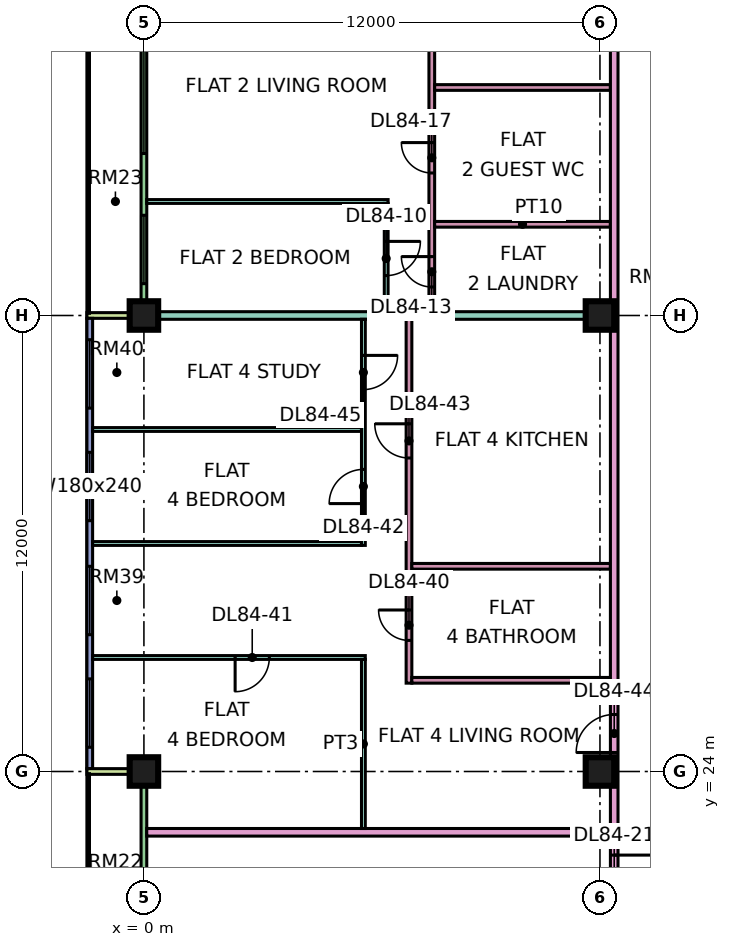
"""IFC4 building model, lengths in metres.
Left out: names, types, materials, properties, quantities, classifications, styles, units other than length and angle.
Written with IfcOpenShell. Run it as: python <this file> out.ifc"""

import sys

from ifc_helpers import new_model, si_unit, direction, frame, frame_2d, origin, origin_2d, place, context, subcontext, project, spatial, rectangle, extrude, element, fill, save


model = new_model("IFC4")
c1 = context("Model", 3, precision=1e-05, world=origin(), true_north=direction((0.0, 1.0)))
c2 = subcontext(c1, "Body", "Model", "MODEL_VIEW")
j1 = project(units=[si_unit("LENGTHUNIT", "METRE"), si_unit("PLANEANGLEUNIT", "RADIAN")], contexts=[c1])
p1 = place(None, origin())
s1 = spatial("IfcSite", under=j1, at=p1, CompositionType="ELEMENT")
p2 = place(p1, origin())
s2 = spatial("IfcBuilding", under=s1, at=p2, CompositionType="ELEMENT")
p3 = place(p2, frame((0.0, 0.0, 361.4)))
s3 = spatial("IfcBuildingStorey", under=s2, at=p3, CompositionType="ELEMENT", Elevation=361.4)
p4 = place(p3, frame((0.0, 24.0, 0.0), z_axis=(0.0, 0.0, 1.0), x_axis=(1.0, 0.0, 0.0)))
e1 = element("IfcColumn", 1, at=p4, inside=s3, PredefinedType="COLUMN", context=c2, shape_type="SweptSolid", body=[
    extrude(rectangle(XDim=0.75, YDim=0.75, at=origin_2d()), origin(), (0.0, 0.0, 1.0), 3.75),
])
p5 = place(p3, frame((0.0, 36.0, 0.0), z_axis=(0.0, 0.0, 1.0), x_axis=(1.0, 0.0, 0.0)))
e2 = element("IfcColumn", 2, at=p5, inside=s3, PredefinedType="COLUMN", context=c2, shape_type="SweptSolid", body=[
    extrude(rectangle(XDim=0.75, YDim=0.75, at=origin_2d()), origin(), (0.0, 0.0, 1.0), 3.75),
])
for number, where, z_axis, x_axis in (
    (3, (12.0, 24.0, 0.0), (0.0, 0.0, 1.0), (1.0, 0.0, 0.0)),
    (4, (12.0, 36.0, 0.0), (0.0, 0.0, 1.0), (1.0, 0.0, 0.0)),
):
    element("IfcColumn", number, at=place(p3, frame(where, z_axis=z_axis, x_axis=x_axis)), inside=s3, PredefinedType="COLUMN", context=c2, shape_type="SweptSolid", body=[
        extrude(rectangle(XDim=0.75, YDim=0.75, at=origin_2d()), origin(), (0.0, 0.0, 1.0), 3.75),
    ])
p6 = place(p3, frame((0.0, 47.925, 0.0), z_axis=(0.0, 0.0, 1.0), x_axis=(0.0, -1.0, 0.0)))
e5 = element("IfcWall", 5, at=p6, inside=s3, PredefinedType="SOLIDWALL", context=c2, shape_type="SweptSolid", body=[
    extrude(rectangle(XDim=11.85, YDim=0.15, at=frame_2d((5.925, 0.0))), origin(), (0.0, 0.0, 1.0), 3.35),
])
p7 = place(p6, frame((0.625, 0.0, 0.0)))
e6 = element("IfcOpeningElement", 6, at=p7, cuts=e5, PredefinedType="OPENING", context=c2, shape_type="SweptSolid", body=[
    extrude(rectangle(XDim=1.2, YDim=2.4, at=frame_2d((0.6, 1.2))), frame((0.0, 0.085, 0.0), z_axis=(0.0, -1.0, 0.0), x_axis=(1.0, 0.0, 0.0)), (0.0, 0.0, 1.0), 0.17),
])
p8 = place(p6, frame((4.663, 0.0, 0.45)))
e7 = element("IfcOpeningElement", 7, at=p8, cuts=e5, PredefinedType="OPENING", context=c2, shape_type="SweptSolid", body=[
    extrude(rectangle(XDim=3.0, YDim=2.4, at=frame_2d((1.5, 1.2))), frame((0.0, 0.085, 0.0), z_axis=(0.0, -1.0, 0.0), x_axis=(1.0, 0.0, 0.0)), (0.0, 0.0, 1.0), 0.17),
])
p9 = place(p6, frame((9.288, 0.0, 0.45)))
e8 = element("IfcOpeningElement", 8, at=p9, cuts=e5, PredefinedType="OPENING", context=c2, shape_type="SweptSolid", body=[
    extrude(rectangle(XDim=1.8, YDim=2.4, at=frame_2d((0.9, 1.2))), frame((0.0, 0.085, 0.0), z_axis=(0.0, -1.0, 0.0), x_axis=(1.0, 0.0, 0.0)), (0.0, 0.0, 1.0), 0.17),
])
p10 = place(p3, frame((-1.5, 36.0, 0.0), z_axis=(0.0, 0.0, 1.0), x_axis=(1.0, 0.0, 0.0)))
e9 = element("IfcWall", 9, at=p10, inside=s3, PredefinedType="SOLIDWALL", context=c2, shape_type="SweptSolid", body=[
    extrude(rectangle(XDim=1.5, YDim=0.15, at=frame_2d((0.75, 0.0))), origin(), (0.0, 0.0, 1.0), 3.35),
])
p11 = place(p3, frame((-1.425, 35.925, 0.0), z_axis=(0.0, 0.0, 1.0), x_axis=(0.0, -1.0, 0.0)))
e10 = element("IfcWall", 10, at=p11, inside=s3, PredefinedType="SOLIDWALL", context=c2, shape_type="SweptSolid", body=[
    extrude(rectangle(XDim=11.85, YDim=0.15, at=frame_2d((5.925, 0.0))), origin(), (0.0, 0.0, 1.0), 3.35),
])
p12 = place(p11, frame((0.562, 0.0, 0.45)))
e11 = element("IfcOpeningElement", 11, at=p12, cuts=e10, PredefinedType="OPENING", context=c2, shape_type="SweptSolid", body=[
    extrude(rectangle(XDim=1.8, YDim=2.4, at=frame_2d((0.9, 1.2))), frame((0.0, 0.085, 0.0), z_axis=(0.0, -1.0, 0.0), x_axis=(1.0, 0.0, 0.0)), (0.0, 0.0, 1.0), 0.17),
])
p13 = place(p11, frame((3.525, 0.0, 0.45)))
e12 = element("IfcOpeningElement", 12, at=p13, cuts=e10, PredefinedType="OPENING", context=c2, shape_type="SweptSolid", body=[
    extrude(rectangle(XDim=1.8, YDim=2.4, at=frame_2d((0.9, 1.2))), frame((0.0, 0.085, 0.0), z_axis=(0.0, -1.0, 0.0), x_axis=(1.0, 0.0, 0.0)), (0.0, 0.0, 1.0), 0.17),
])
p14 = place(p11, frame((6.525, 0.0, 0.45)))
e13 = element("IfcOpeningElement", 13, at=p14, cuts=e10, PredefinedType="OPENING", context=c2, shape_type="SweptSolid", body=[
    extrude(rectangle(XDim=1.8, YDim=2.4, at=frame_2d((0.9, 1.2))), frame((0.0, 0.085, 0.0), z_axis=(0.0, -1.0, 0.0), x_axis=(1.0, 0.0, 0.0)), (0.0, 0.0, 1.0), 0.17),
])
p15 = place(p11, frame((9.488, 0.0, 0.45)))
e14 = element("IfcOpeningElement", 14, at=p15, cuts=e10, PredefinedType="OPENING", context=c2, shape_type="SweptSolid", body=[
    extrude(rectangle(XDim=1.8, YDim=2.4, at=frame_2d((0.9, 1.2))), frame((0.0, 0.085, 0.0), z_axis=(0.0, -1.0, 0.0), x_axis=(1.0, 0.0, 0.0)), (0.0, 0.0, 1.0), 0.17),
])
p16 = place(p3, frame((0.0, 23.925, 0.0), z_axis=(0.0, 0.0, 1.0), x_axis=(0.0, -1.0, 0.0)))
e15 = element("IfcWall", 15, at=p16, inside=s3, PredefinedType="SOLIDWALL", context=c2, shape_type="SweptSolid", body=[
    extrude(rectangle(XDim=11.35, YDim=0.15, at=frame_2d((5.675, 0.0))), origin(), (0.0, 0.0, 1.0), 3.35),
])
p17 = place(p16, frame((6.738, 0.0, 0.0)))
e16 = element("IfcOpeningElement", 16, at=p17, cuts=e15, PredefinedType="OPENING", context=c2, shape_type="SweptSolid", body=[
    extrude(rectangle(XDim=1.8, YDim=2.4, at=frame_2d((0.9, 1.2))), frame((0.0, 0.085, 0.0), z_axis=(0.0, -1.0, 0.0), x_axis=(1.0, 0.0, 0.0)), (0.0, 0.0, 1.0), 0.17),
])
p18 = place(p3, frame((-1.5, 24.0, 0.0), z_axis=(0.0, 0.0, 1.0), x_axis=(1.0, 0.0, 0.0)))
e17 = element("IfcWall", 17, at=p18, inside=s3, PredefinedType="SOLIDWALL", context=c2, shape_type="SweptSolid", body=[
    extrude(rectangle(XDim=1.5, YDim=0.15, at=frame_2d((0.75, 0.0))), origin(), (0.0, 0.0, 1.0), 3.35),
])
p19 = place(p3, frame((-1.35, 27.0, 0.0), z_axis=(0.0, 0.0, 1.0), x_axis=(1.0, 0.0, 0.0)))
e18 = element("IfcWall", 18, at=p19, inside=s3, PredefinedType="PARTITIONING", context=c2, shape_type="SweptSolid", body=[
    extrude(rectangle(XDim=7.175, YDim=0.1, at=frame_2d((3.587, 0.0))), origin(), (0.0, 0.0, 1.0), 3.35),
])
p20 = place(p19, frame((3.75, 0.0, 0.0)))
e19 = element("IfcOpeningElement", 19, at=p20, cuts=e18, PredefinedType="OPENING", context=c2, shape_type="SweptSolid", body=[
    extrude(rectangle(XDim=0.9, YDim=2.1, at=frame_2d((0.45, 1.05))), frame((0.0, 0.06, 0.0), z_axis=(0.0, -1.0, 0.0), x_axis=(1.0, 0.0, 0.0)), (0.0, 0.0, 1.0), 0.12),
])
for number, where, z_axis, x_axis in (
    (20, (-1.35, 30.0, 0.0), (0.0, 0.0, 1.0), (1.0, 0.0, 0.0)),
    (21, (-1.35, 33.0, 0.0), (0.0, 0.0, 1.0), (1.0, 0.0, 0.0)),
):
    element("IfcWall", number, at=place(p3, frame(where, z_axis=z_axis, x_axis=x_axis)), inside=s3, PredefinedType="PARTITIONING", context=c2, shape_type="SweptSolid", body=[
        extrude(rectangle(XDim=7.075, YDim=0.1, at=frame_2d((3.538, 0.0))), origin(), (0.0, 0.0, 1.0), 3.35),
    ])
e22 = element("IfcWall", 22, at=p5, inside=s3, PredefinedType="PARTITIONING", context=c2, shape_type="SweptSolid", body=[
    extrude(rectangle(XDim=12.275, YDim=0.2, at=frame_2d((6.137, 0.0))), origin(), (0.0, 0.0, 1.0), 3.35),
])
p21 = place(p3, frame((0.074, 22.4, 0.0), z_axis=(0.0, 0.0, 1.0), x_axis=(1.0, 0.0, 0.0)))
e23 = element("IfcWall", 23, at=p21, inside=s3, PredefinedType="PARTITIONING", context=c2, shape_type="SweptSolid", body=[
    extrude(rectangle(XDim=12.201, YDim=0.2, at=frame_2d((6.101, 0.0))), origin(), (0.0, 0.0, 1.0), 3.35),
])
p22 = place(p3, frame((0.074, 39.0, 0.0), z_axis=(0.0, 0.0, 1.0), x_axis=(1.0, 0.0, 0.0)))
e24 = element("IfcWall", 24, at=p22, inside=s3, PredefinedType="PARTITIONING", context=c2, shape_type="SweptSolid", body=[
    extrude(rectangle(XDim=6.351, YDim=0.1, at=frame_2d((3.176, 0.0))), origin(), (0.0, 0.0, 1.0), 3.35),
])
p23 = place(p3, frame((5.775, 22.5, 0.0), z_axis=(0.0, 0.0, 1.0), x_axis=(0.0, 1.0, 0.0)))
e25 = element("IfcWall", 25, at=p23, inside=s3, PredefinedType="PARTITIONING", context=c2, shape_type="SweptSolid", body=[
    extrude(rectangle(XDim=4.45, YDim=0.1, at=frame_2d((2.225, 0.0))), origin(), (0.0, 0.0, 1.0), 3.35),
])
p24 = place(p3, frame((5.775, 29.95, 0.0), z_axis=(0.0, 0.0, 1.0), x_axis=(0.0, 1.0, 0.0)))
e26 = element("IfcWall", 26, at=p24, inside=s3, PredefinedType="PARTITIONING", context=c2, shape_type="SweptSolid", body=[
    extrude(rectangle(XDim=5.95, YDim=0.1, at=frame_2d((2.975, 0.0))), origin(), (0.0, 0.0, 1.0), 3.35),
])
p25 = place(p24, frame((1.1, 0.0, 0.0)))
e27 = element("IfcOpeningElement", 27, at=p25, cuts=e26, PredefinedType="OPENING", context=c2, shape_type="SweptSolid", body=[
    extrude(rectangle(XDim=0.9, YDim=2.1, at=frame_2d((0.45, 1.05))), frame((0.0, 0.06, 0.0), z_axis=(0.0, -1.0, 0.0), x_axis=(1.0, 0.0, 0.0)), (0.0, 0.0, 1.0), 0.12),
])
p26 = place(p24, frame((4.1, 0.0, 0.0)))
e28 = element("IfcOpeningElement", 28, at=p26, cuts=e26, PredefinedType="OPENING", context=c2, shape_type="SweptSolid", body=[
    extrude(rectangle(XDim=0.9, YDim=2.1, at=frame_2d((0.45, 1.05))), frame((0.0, 0.06, 0.0), z_axis=(0.0, -1.0, 0.0), x_axis=(1.0, 0.0, 0.0)), (0.0, 0.0, 1.0), 0.12),
])
p27 = place(p3, frame((6.375, 36.1, 0.0), z_axis=(0.0, 0.0, 1.0), x_axis=(0.0, 1.0, 0.0)))
e29 = element("IfcWall", 29, at=p27, inside=s3, PredefinedType="PARTITIONING", context=c2, shape_type="SweptSolid", body=[
    extrude(rectangle(XDim=2.85, YDim=0.1, at=frame_2d((1.425, 0.0))), origin(), (0.0, 0.0, 1.0), 3.35),
])
p28 = place(p27, frame((0.95, 0.0, 0.0)))
e30 = element("IfcOpeningElement", 30, at=p28, cuts=e29, PredefinedType="OPENING", context=c2, shape_type="SweptSolid", body=[
    extrude(rectangle(XDim=0.9, YDim=2.1, at=frame_2d((0.45, 1.05))), frame((0.0, 0.06, 0.0), z_axis=(0.0, -1.0, 0.0), x_axis=(1.0, 0.0, 0.0)), (0.0, 0.0, 1.0), 0.12),
])
p29 = place(p3, frame((6.975, 26.325, 0.0), z_axis=(0.0, 0.0, 1.0), x_axis=(0.0, 1.0, 0.0)))
e31 = element("IfcWall", 31, at=p29, inside=s3, PredefinedType="PARTITIONING", context=c2, shape_type="SweptSolid", body=[
    extrude(rectangle(XDim=9.575, YDim=0.15, at=frame_2d((4.788, 0.0))), origin(), (0.0, 0.0, 1.0), 3.35),
])
p30 = place(p29, frame((1.125, 0.0, 0.0)))
e32 = element("IfcOpeningElement", 32, at=p30, cuts=e31, PredefinedType="OPENING", context=c2, shape_type="SweptSolid", body=[
    extrude(rectangle(XDim=0.8, YDim=2.1, at=frame_2d((0.4, 1.05))), frame((0.0, 0.085, 0.0), z_axis=(0.0, -1.0, 0.0), x_axis=(1.0, 0.0, 0.0)), (0.0, 0.0, 1.0), 0.17),
])
p31 = place(p29, frame((5.925, 0.0, 0.0)))
e33 = element("IfcOpeningElement", 33, at=p31, cuts=e31, PredefinedType="OPENING", context=c2, shape_type="SweptSolid", body=[
    extrude(rectangle(XDim=0.9, YDim=2.1, at=frame_2d((0.45, 1.05))), frame((0.0, 0.085, 0.0), z_axis=(0.0, -1.0, 0.0), x_axis=(1.0, 0.0, 0.0)), (0.0, 0.0, 1.0), 0.17),
])
for number, where, z_axis, x_axis in (
    (34, (7.05, 26.4, 0.0), (0.0, 0.0, 1.0), (1.0, 0.0, 0.0)),
    (35, (7.05, 29.4, 0.0), (0.0, 0.0, 1.0), (1.0, 0.0, 0.0)),
):
    element("IfcWall", number, at=place(p3, frame(where, z_axis=z_axis, x_axis=x_axis)), inside=s3, PredefinedType="PARTITIONING", context=c2, shape_type="SweptSolid", body=[
        extrude(rectangle(XDim=5.225, YDim=0.15, at=frame_2d((2.612, 0.0))), origin(), (0.0, 0.0, 1.0), 3.35),
    ])
p32 = place(p3, frame((7.575, 36.1, 0.0), z_axis=(0.0, 0.0, 1.0), x_axis=(0.0, 1.0, 0.0)))
e36 = element("IfcWall", 36, at=p32, inside=s3, PredefinedType="PARTITIONING", context=c2, shape_type="SweptSolid", body=[
    extrude(rectangle(XDim=12.575, YDim=0.15, at=frame_2d((6.288, 0.0))), origin(), (0.0, 0.0, 1.0), 3.35),
])
p33 = place(p32, frame((0.65, 0.0, 0.0)))
e37 = element("IfcOpeningElement", 37, at=p33, cuts=e36, PredefinedType="OPENING", context=c2, shape_type="SweptSolid", body=[
    extrude(rectangle(XDim=0.8, YDim=2.1, at=frame_2d((0.4, 1.05))), frame((0.0, 0.085, 0.0), z_axis=(0.0, -1.0, 0.0), x_axis=(1.0, 0.0, 0.0)), (0.0, 0.0, 1.0), 0.17),
])
p34 = place(p32, frame((3.65, 0.0, 0.0)))
e38 = element("IfcOpeningElement", 38, at=p34, cuts=e36, PredefinedType="OPENING", context=c2, shape_type="SweptSolid", body=[
    extrude(rectangle(XDim=0.8, YDim=2.1, at=frame_2d((0.4, 1.05))), frame((0.0, 0.085, 0.0), z_axis=(0.0, -1.0, 0.0), x_axis=(1.0, 0.0, 0.0)), (0.0, 0.0, 1.0), 0.17),
])
p35 = place(p32, frame((7.1, 0.0, 0.0)))
e39 = element("IfcOpeningElement", 39, at=p35, cuts=e36, PredefinedType="OPENING", context=c2, shape_type="SweptSolid", body=[
    extrude(rectangle(XDim=0.8, YDim=2.1, at=frame_2d((0.4, 1.05))), frame((0.0, 0.085, 0.0), z_axis=(0.0, -1.0, 0.0), x_axis=(1.0, 0.0, 0.0)), (0.0, 0.0, 1.0), 0.17),
])
for number, where, z_axis, x_axis in (
    (40, (7.65, 38.4, 0.0), (0.0, 0.0, 1.0), (1.0, 0.0, 0.0)),
    (41, (7.65, 42.0, 0.0), (0.0, 0.0, 1.0), (1.0, 0.0, 0.0)),
):
    element("IfcWall", number, at=place(p3, frame(where, z_axis=z_axis, x_axis=x_axis)), inside=s3, PredefinedType="PARTITIONING", context=c2, shape_type="SweptSolid", body=[
        extrude(rectangle(XDim=4.625, YDim=0.15, at=frame_2d((2.312, 0.0))), origin(), (0.0, 0.0, 1.0), 3.35),
    ])
p36 = place(p3, frame((12.375, 20.0, 0.0), z_axis=(0.0, 0.0, 1.0), x_axis=(0.0, 1.0, 0.0)))
e42 = element("IfcWall", 42, at=p36, inside=s3, PredefinedType="PARTITIONING", context=c2, shape_type="SweptSolid", body=[
    extrude(rectangle(XDim=33.926, YDim=0.2, at=frame_2d((16.963, 0.0))), origin(), (0.0, 0.0, 1.0), 3.35),
])
p37 = place(p36, frame((29.4, 0.0, 0.0)))
e43 = element("IfcOpeningElement", 43, at=p37, cuts=e42, PredefinedType="OPENING", context=c2, shape_type="SweptSolid", body=[
    extrude(rectangle(XDim=1.0, YDim=2.1, at=frame_2d((0.5, 1.05))), frame((0.0, 0.11, 0.0), z_axis=(0.0, -1.0, 0.0), x_axis=(1.0, 0.0, 0.0)), (0.0, 0.0, 1.0), 0.22),
])
p38 = place(p36, frame((0.6, 0.0, 0.0)))
e44 = element("IfcOpeningElement", 44, at=p38, cuts=e42, PredefinedType="OPENING", context=c2, shape_type="SweptSolid", body=[
    extrude(rectangle(XDim=1.2, YDim=2.1, at=frame_2d((0.6, 1.05))), frame((0.0, 0.11, 0.0), z_axis=(0.0, -1.0, 0.0), x_axis=(1.0, 0.0, 0.0)), (0.0, 0.0, 1.0), 0.22),
])
p39 = place(p36, frame((4.5, 0.0, 0.0)))
e45 = element("IfcOpeningElement", 45, at=p39, cuts=e42, PredefinedType="OPENING", context=c2, shape_type="SweptSolid", body=[
    extrude(rectangle(XDim=1.0, YDim=2.1, at=frame_2d((0.5, 1.05))), frame((0.0, 0.11, 0.0), z_axis=(0.0, -1.0, 0.0), x_axis=(1.0, 0.0, 0.0)), (0.0, 0.0, 1.0), 0.22),
])
p40 = place(p8, origin())
e46 = element("IfcWindow", 46, at=p40, inside=s3, PartitioningType="SINGLE_PANEL", PredefinedType="WINDOW", context=c2, shape_type="SweptSolid", body=[
    extrude(rectangle(XDim=3.0, YDim=2.4, at=frame_2d((1.5, 1.2))), frame((0.0, 0.03, 0.0), z_axis=(0.0, -1.0, 0.0), x_axis=(1.0, 0.0, 0.0)), (0.0, 0.0, 1.0), 0.06),
])
fill(e7, e46)
p41 = place(p9, origin())
e47 = element("IfcWindow", 47, at=p41, inside=s3, PartitioningType="SINGLE_PANEL", PredefinedType="WINDOW", context=c2, shape_type="SweptSolid", body=[
    extrude(rectangle(XDim=1.8, YDim=2.4, at=frame_2d((0.9, 1.2))), frame((0.0, 0.03, 0.0), z_axis=(0.0, -1.0, 0.0), x_axis=(1.0, 0.0, 0.0)), (0.0, 0.0, 1.0), 0.06),
])
fill(e8, e47)
p42 = place(p12, origin())
e48 = element("IfcWindow", 48, at=p42, inside=s3, PartitioningType="SINGLE_PANEL", PredefinedType="WINDOW", context=c2, shape_type="SweptSolid", body=[
    extrude(rectangle(XDim=1.8, YDim=2.4, at=frame_2d((0.9, 1.2))), frame((0.0, 0.03, 0.0), z_axis=(0.0, -1.0, 0.0), x_axis=(1.0, 0.0, 0.0)), (0.0, 0.0, 1.0), 0.06),
])
fill(e11, e48)
p43 = place(p13, origin())
e49 = element("IfcWindow", 49, at=p43, inside=s3, PartitioningType="SINGLE_PANEL", PredefinedType="WINDOW", context=c2, shape_type="SweptSolid", body=[
    extrude(rectangle(XDim=1.8, YDim=2.4, at=frame_2d((0.9, 1.2))), frame((0.0, 0.03, 0.0), z_axis=(0.0, -1.0, 0.0), x_axis=(1.0, 0.0, 0.0)), (0.0, 0.0, 1.0), 0.06),
])
fill(e12, e49)
p44 = place(p14, origin())
e50 = element("IfcWindow", 50, at=p44, inside=s3, PartitioningType="SINGLE_PANEL", PredefinedType="WINDOW", context=c2, shape_type="SweptSolid", body=[
    extrude(rectangle(XDim=1.8, YDim=2.4, at=frame_2d((0.9, 1.2))), frame((0.0, 0.03, 0.0), z_axis=(0.0, -1.0, 0.0), x_axis=(1.0, 0.0, 0.0)), (0.0, 0.0, 1.0), 0.06),
])
fill(e13, e50)
p45 = place(p15, origin())
e51 = element("IfcWindow", 51, at=p45, inside=s3, PartitioningType="SINGLE_PANEL", PredefinedType="WINDOW", context=c2, shape_type="SweptSolid", body=[
    extrude(rectangle(XDim=1.8, YDim=2.4, at=frame_2d((0.9, 1.2))), frame((0.0, 0.03, 0.0), z_axis=(0.0, -1.0, 0.0), x_axis=(1.0, 0.0, 0.0)), (0.0, 0.0, 1.0), 0.06),
])
fill(e14, e51)
p46 = place(p28, origin())
e52 = element("IfcDoor", 52, at=p46, inside=s3, OperationType="SINGLE_SWING_RIGHT", PredefinedType="DOOR", context=c2, shape_type="SweptSolid", body=[
    extrude(rectangle(XDim=0.9, YDim=2.1, at=frame_2d((0.45, 1.05))), frame((0.0, 0.025, 0.0), z_axis=(0.0, -1.0, 0.0), x_axis=(1.0, 0.0, 0.0)), (0.0, 0.0, 1.0), 0.05),
])
fill(e30, e52)
p47 = place(p33, frame((0.8, 0.0, 0.0), z_axis=(0.0, 0.0, 1.0), x_axis=(-1.0, 0.0, 0.0)))
e53 = element("IfcDoor", 53, at=p47, inside=s3, OperationType="SINGLE_SWING_RIGHT", PredefinedType="DOOR", context=c2, shape_type="SweptSolid", body=[
    extrude(rectangle(XDim=0.8, YDim=2.1, at=frame_2d((0.4, 1.05))), frame((0.0, 0.025, 0.0), z_axis=(0.0, -1.0, 0.0), x_axis=(1.0, 0.0, 0.0)), (0.0, 0.0, 1.0), 0.05),
])
fill(e37, e53)
p48 = place(p34, frame((0.8, 0.0, 0.0), z_axis=(0.0, 0.0, 1.0), x_axis=(-1.0, 0.0, 0.0)))
e54 = element("IfcDoor", 54, at=p48, inside=s3, OperationType="SINGLE_SWING_RIGHT", PredefinedType="DOOR", context=c2, shape_type="SweptSolid", body=[
    extrude(rectangle(XDim=0.8, YDim=2.1, at=frame_2d((0.4, 1.05))), frame((0.0, 0.025, 0.0), z_axis=(0.0, -1.0, 0.0), x_axis=(1.0, 0.0, 0.0)), (0.0, 0.0, 1.0), 0.05),
])
fill(e38, e54)
p49 = place(p38, origin())
e55 = element("IfcDoor", 55, at=p49, inside=s3, OperationType="SINGLE_SWING_RIGHT", PredefinedType="DOOR", context=c2, shape_type="SweptSolid", body=[
    extrude(rectangle(XDim=1.2, YDim=2.1, at=frame_2d((0.6, 1.05))), frame((0.0, 0.025, 0.0), z_axis=(0.0, -1.0, 0.0), x_axis=(1.0, 0.0, 0.0)), (0.0, 0.0, 1.0), 0.05),
])
fill(e44, e55)
p50 = place(p30, frame((0.8, 0.0, 0.0), z_axis=(0.0, 0.0, 1.0), x_axis=(-1.0, 0.0, 0.0)))
e56 = element("IfcDoor", 56, at=p50, inside=s3, OperationType="SINGLE_SWING_RIGHT", PredefinedType="DOOR", context=c2, shape_type="SweptSolid", body=[
    extrude(rectangle(XDim=0.8, YDim=2.1, at=frame_2d((0.4, 1.05))), frame((0.0, 0.025, 0.0), z_axis=(0.0, -1.0, 0.0), x_axis=(1.0, 0.0, 0.0)), (0.0, 0.0, 1.0), 0.05),
])
fill(e32, e56)
p51 = place(p20, frame((0.9, 0.0, 0.0), z_axis=(0.0, 0.0, 1.0), x_axis=(-1.0, 0.0, 0.0)))
e57 = element("IfcDoor", 57, at=p51, inside=s3, OperationType="SINGLE_SWING_LEFT", PredefinedType="DOOR", context=c2, shape_type="SweptSolid", body=[
    extrude(rectangle(XDim=0.9, YDim=2.1, at=frame_2d((0.45, 1.05))), frame((0.0, 0.025, 0.0), z_axis=(0.0, -1.0, 0.0), x_axis=(1.0, 0.0, 0.0)), (0.0, 0.0, 1.0), 0.05),
])
fill(e19, e57)
p52 = place(p25, origin())
e58 = element("IfcDoor", 58, at=p52, inside=s3, OperationType="SINGLE_SWING_LEFT", PredefinedType="DOOR", context=c2, shape_type="SweptSolid", body=[
    extrude(rectangle(XDim=0.9, YDim=2.1, at=frame_2d((0.45, 1.05))), frame((0.0, 0.025, 0.0), z_axis=(0.0, -1.0, 0.0), x_axis=(1.0, 0.0, 0.0)), (0.0, 0.0, 1.0), 0.05),
])
fill(e27, e58)
p53 = place(p31, frame((0.9, 0.0, 0.0), z_axis=(0.0, 0.0, 1.0), x_axis=(-1.0, 0.0, 0.0)))
e59 = element("IfcDoor", 59, at=p53, inside=s3, OperationType="SINGLE_SWING_RIGHT", PredefinedType="DOOR", context=c2, shape_type="SweptSolid", body=[
    extrude(rectangle(XDim=0.9, YDim=2.1, at=frame_2d((0.45, 1.05))), frame((0.0, 0.025, 0.0), z_axis=(0.0, -1.0, 0.0), x_axis=(1.0, 0.0, 0.0)), (0.0, 0.0, 1.0), 0.05),
])
fill(e33, e59)
p54 = place(p39, origin())
e60 = element("IfcDoor", 60, at=p54, inside=s3, OperationType="SINGLE_SWING_LEFT", PredefinedType="DOOR", context=c2, shape_type="SweptSolid", body=[
    extrude(rectangle(XDim=1.0, YDim=2.1, at=frame_2d((0.5, 1.05))), frame((0.0, 0.025, 0.0), z_axis=(0.0, -1.0, 0.0), x_axis=(1.0, 0.0, 0.0)), (0.0, 0.0, 1.0), 0.05),
])
fill(e45, e60)
p55 = place(p26, origin())
e61 = element("IfcDoor", 61, at=p55, inside=s3, OperationType="SINGLE_SWING_RIGHT", PredefinedType="DOOR", context=c2, shape_type="SweptSolid", body=[
    extrude(rectangle(XDim=0.9, YDim=2.1, at=frame_2d((0.45, 1.05))), frame((0.0, 0.025, 0.0), z_axis=(0.0, -1.0, 0.0), x_axis=(1.0, 0.0, 0.0)), (0.0, 0.0, 1.0), 0.05),
])
fill(e28, e61)
save(model, sys.argv[1])
